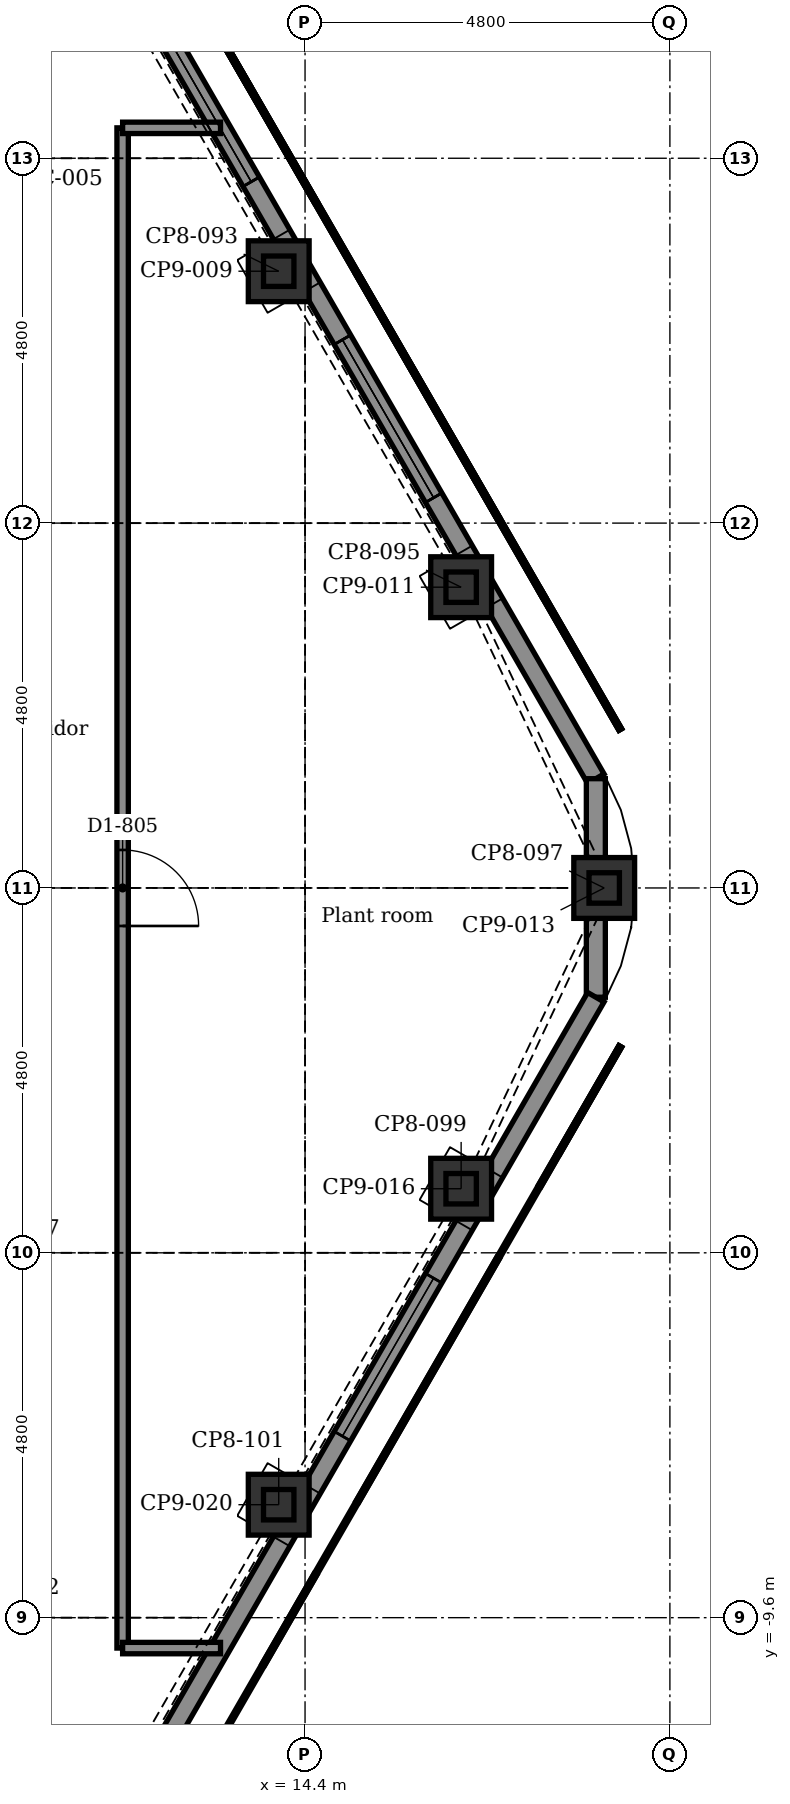
"""IFC4 building model, lengths in metres.
Left out: names, types, materials, properties, quantities, classifications, styles, units other than length and angle.
Written with IfcOpenShell. Run it as: python <this file> out.ifc"""

import sys

from ifc_helpers import new_model, si_unit, direction, frame, frame_2d, origin, origin_2d, place, context, subcontext, project, spatial, polyline, rectangle, hollow_rectangle, outline, extrude, element, fill, save


model = new_model("IFC4")
c1 = context("Model", 3, precision=1e-05, world=origin(), true_north=direction((0.0, 1.0)))
c2 = subcontext(c1, "Body", "Model", "MODEL_VIEW")
j1 = project(units=[si_unit("LENGTHUNIT", "METRE"), si_unit("PLANEANGLEUNIT", "RADIAN")], contexts=[c1])
p1 = place(None, origin())
s1 = spatial("IfcSite", under=j1, at=p1, CompositionType="ELEMENT")
p2 = place(p1, origin())
s2 = spatial("IfcBuilding", under=s1, at=p2, CompositionType="ELEMENT")
p3 = place(p2, frame((0.0, 0.0, 301.9)))
s3 = spatial("IfcBuildingStorey", under=s2, at=p3, CompositionType="ELEMENT", Elevation=301.9)
for number, where, z_axis, x_axis in (
    (1, (14.054, 8.114, -0.3), (0.0, 0.0, 1.0), (0.866, 0.5, 0.0)),
    (2, (16.454, 3.957, -0.3), (0.0, 0.0, 1.0), (0.866, 0.5, 0.0)),
    (3, (18.336, 0.0, -0.3), (0.0, 0.0, 1.0), (1.0, 0.0, 0.0)),
    (4, (16.454, -3.957, -0.3), (0.0, 0.0, 1.0), (0.5, 0.866, 0.0)),
    (5, (14.054, -8.114, -0.3), (0.0, 0.0, 1.0), (0.5, 0.866, 0.0)),
):
    element("IfcColumn", number, at=place(p3, frame(where, z_axis=z_axis, x_axis=x_axis)), inside=s3, PredefinedType="COLUMN", context=c2, shape_type="SweptSolid", body=[
        extrude(rectangle(XDim=0.8, YDim=0.8, at=origin_2d()), origin(), (0.0, 0.0, 1.0), 5.3),
    ])
p4 = place(p3, frame((14.054, 8.114, 5.0), z_axis=(0.0, 0.0, 1.0), x_axis=(1.0, 0.0, 0.0)))
e6 = element("IfcColumn", 6, at=p4, inside=s3, PredefinedType="COLUMN", context=c2, shape_type="SweptSolid", body=[
    extrude(hollow_rectangle(XDim=0.4, YDim=0.4, WallThickness=0.02, at=origin_2d()), origin(), (0.0, 0.0, 1.0), 14.916),
])
p5 = place(p3, frame((16.454, 3.957, 5.0), z_axis=(0.0, 0.0, 1.0), x_axis=(1.0, 0.0, 0.0)))
e7 = element("IfcColumn", 7, at=p5, inside=s3, PredefinedType="COLUMN", context=c2, shape_type="SweptSolid", body=[
    extrude(hollow_rectangle(XDim=0.4, YDim=0.4, WallThickness=0.02, at=origin_2d()), origin(), (0.0, 0.0, 1.0), 12.318),
])
p6 = place(p3, frame((18.336, 0.0, 5.0), z_axis=(0.0, 0.0, 1.0), x_axis=(1.0, 0.0, 0.0)))
e8 = element("IfcColumn", 8, at=p6, inside=s3, PredefinedType="COLUMN", context=c2, shape_type="SweptSolid", body=[
    extrude(hollow_rectangle(XDim=0.4, YDim=0.4, WallThickness=0.02, at=origin_2d()), origin(), (0.0, 0.0, 1.0), 9.845),
])
p7 = place(p3, frame((16.454, -3.957, 5.0), z_axis=(0.0, 0.0, 1.0), x_axis=(1.0, 0.0, 0.0)))
e9 = element("IfcColumn", 9, at=p7, inside=s3, PredefinedType="COLUMN", context=c2, shape_type="SweptSolid", body=[
    extrude(hollow_rectangle(XDim=0.4, YDim=0.4, WallThickness=0.02, at=origin_2d()), origin(), (0.0, 0.0, 1.0), 7.373),
])
p8 = place(p3, frame((14.054, -8.114, 5.0), z_axis=(0.0, 0.0, 1.0), x_axis=(1.0, 0.0, 0.0)))
e10 = element("IfcColumn", 10, at=p8, inside=s3, PredefinedType="COLUMN", context=c2, shape_type="SweptSolid", body=[
    extrude(hollow_rectangle(XDim=0.4, YDim=0.4, WallThickness=0.02, at=origin_2d()), origin(), (0.0, 0.0, 1.0), 4.775),
])
p9 = place(p3, frame((10.358, 15.065, 0.0), z_axis=(0.0, 0.0, 1.0), x_axis=(0.500010301671, -0.86601945603, 0.0)))
e11 = element("IfcWall", 11, at=p9, inside=s3, PredefinedType="SOLIDWALL", context=c2, shape_type="SweptSolid", body=[
    extrude(outline(polyline([(0.0, 0.0), (15.736, 0.0), (15.736, 15.994), (0.0, 24.509), (0.0, 0.0)])), frame((0.0, 0.125, 0.0), z_axis=(0.0, -1.0, 0.0), x_axis=(1.0, 0.0, 0.0)), (0.0, 0.0, 1.0), 0.25),
])
p10 = place(p9, frame((4.268, 0.0, 5.8)))
e12 = element("IfcOpeningElement", 12, at=p10, cuts=e11, PredefinedType="OPENING", context=c2, shape_type="SweptSolid", body=[
    extrude(rectangle(XDim=2.4, YDim=3.6, at=frame_2d((1.2, 1.8))), frame((0.0, 0.135, 0.0), z_axis=(0.0, -1.0, 0.0), x_axis=(1.0, 0.0, 0.0)), (0.0, 0.0, 1.0), 0.27),
])
p11 = place(p9, frame((4.268, 0.0, 10.0)))
e13 = element("IfcOpeningElement", 13, at=p11, cuts=e11, PredefinedType="OPENING", context=c2, shape_type="SweptSolid", body=[
    extrude(rectangle(XDim=2.4, YDim=3.6, at=frame_2d((1.2, 1.8))), frame((0.0, 0.135, 0.0), z_axis=(0.0, -1.0, 0.0), x_axis=(1.0, 0.0, 0.0)), (0.0, 0.0, 1.0), 0.27),
])
p12 = place(p9, frame((4.268, 0.0, 14.2)))
e14 = element("IfcOpeningElement", 14, at=p12, cuts=e11, PredefinedType="OPENING", context=c2, shape_type="SweptSolid", body=[
    extrude(rectangle(XDim=2.4, YDim=3.6, at=frame_2d((1.2, 1.8))), frame((0.0, 0.135, 0.0), z_axis=(0.0, -1.0, 0.0), x_axis=(1.0, 0.0, 0.0)), (0.0, 0.0, 1.0), 0.27),
])
p13 = place(p9, frame((9.068, 0.0, 5.8)))
e15 = element("IfcOpeningElement", 15, at=p13, cuts=e11, PredefinedType="OPENING", context=c2, shape_type="SweptSolid", body=[
    extrude(rectangle(XDim=2.4, YDim=3.6, at=frame_2d((1.2, 1.8))), frame((0.0, 0.135, 0.0), z_axis=(0.0, -1.0, 0.0), x_axis=(1.0, 0.0, 0.0)), (0.0, 0.0, 1.0), 0.27),
])
p14 = place(p9, frame((9.068, 0.0, 10.0)))
e16 = element("IfcOpeningElement", 16, at=p14, cuts=e11, PredefinedType="OPENING", context=c2, shape_type="SweptSolid", body=[
    extrude(rectangle(XDim=2.4, YDim=3.6, at=frame_2d((1.2, 1.8))), frame((0.0, 0.135, 0.0), z_axis=(0.0, -1.0, 0.0), x_axis=(1.0, 0.0, 0.0)), (0.0, 0.0, 1.0), 0.27),
])
p15 = place(p9, frame((9.068, 0.0, 1.0)))
e17 = element("IfcOpeningElement", 17, at=p15, cuts=e11, PredefinedType="OPENING", context=c2, shape_type="SweptSolid", body=[
    extrude(rectangle(XDim=2.4, YDim=3.0, at=frame_2d((1.2, 1.5))), frame((0.0, 0.135, 0.0), z_axis=(0.0, -1.0, 0.0), x_axis=(1.0, 0.0, 0.0)), (0.0, 0.0, 1.0), 0.27),
])
p16 = place(p3, frame((18.226, 1.438, 0.0), z_axis=(0.0, 0.0, 1.0), x_axis=(0.0, -1.0, 0.0)))
e18 = element("IfcWall", 18, at=p16, inside=s3, PredefinedType="SOLIDWALL", context=c2, shape_type="SweptSolid", body=[
    extrude(outline(polyline([(0.0, 0.0), (2.875, 0.0), (2.875, 14.197), (0.0, 15.994), (0.0, 0.0)])), frame((0.0, 0.125, 0.0), z_axis=(0.0, -1.0, 0.0), x_axis=(1.0, 0.0, 0.0)), (0.0, 0.0, 1.0), 0.25),
])
p17 = place(p3, frame((18.226, -1.438, 0.0), z_axis=(0.0, 0.0, 1.0), x_axis=(-0.500010301671, -0.86601945603, 0.0)))
e19 = element("IfcWall", 19, at=p17, inside=s3, PredefinedType="SOLIDWALL", context=c2, shape_type="SweptSolid", body=[
    extrude(outline(polyline([(0.0, 0.0), (15.736, 0.0), (15.736, 5.682), (0.0, 14.197), (0.0, 0.0)])), frame((0.0, 0.125, 0.0), z_axis=(0.0, -1.0, 0.0), x_axis=(1.0, 0.0, 0.0)), (0.0, 0.0, 1.0), 0.25),
])
p18 = place(p17, frame((4.268, 0.0, 5.8)))
e20 = element("IfcOpeningElement", 20, at=p18, cuts=e19, PredefinedType="OPENING", context=c2, shape_type="SweptSolid", body=[
    extrude(rectangle(XDim=2.4, YDim=3.6, at=frame_2d((1.2, 1.8))), frame((0.0, 0.135, 0.0), z_axis=(0.0, -1.0, 0.0), x_axis=(1.0, 0.0, 0.0)), (0.0, 0.0, 1.0), 0.27),
])
p19 = place(p17, frame((4.268, 0.0, 1.0)))
e21 = element("IfcOpeningElement", 21, at=p19, cuts=e19, PredefinedType="OPENING", context=c2, shape_type="SweptSolid", body=[
    extrude(rectangle(XDim=2.4, YDim=3.0, at=frame_2d((1.2, 1.5))), frame((0.0, 0.135, 0.0), z_axis=(0.0, -1.0, 0.0), x_axis=(1.0, 0.0, 0.0)), (0.0, 0.0, 1.0), 0.27),
])
p20 = place(p3, frame((12.0, -10.0, 0.0), z_axis=(0.0, 0.0, 1.0), x_axis=(0.0, 1.0, 0.0)))
e22 = element("IfcWall", 22, at=p20, inside=s3, PredefinedType="PARTITIONING", context=c2, shape_type="SweptSolid", body=[
    extrude(rectangle(XDim=20.0, YDim=0.15, at=frame_2d((10.0, 0.0))), origin(), (0.0, 0.0, 1.0), 5.0),
])
p21 = place(p20, frame((9.5, 0.0, 0.0)))
e23 = element("IfcOpeningElement", 23, at=p21, cuts=e22, PredefinedType="OPENING", context=c2, shape_type="SweptSolid", body=[
    extrude(rectangle(XDim=1.0, YDim=2.1, at=frame_2d((0.5, 1.05))), frame((0.0, 0.085, 0.0), z_axis=(0.0, -1.0, 0.0), x_axis=(1.0, 0.0, 0.0)), (0.0, 0.0, 1.0), 0.17),
])
for number, where, z_axis, x_axis in (
    (24, (12.0, -10.0, 0.0), (0.0, 0.0, 1.0), (1.0, 0.0, 0.0)),
    (25, (12.0, 10.0, 0.0), (0.0, 0.0, 1.0), (1.0, 0.0, 0.0)),
):
    element("IfcWall", number, at=place(p3, frame(where, z_axis=z_axis, x_axis=x_axis)), inside=s3, PredefinedType="PARTITIONING", context=c2, shape_type="SweptSolid", body=[
        extrude(rectangle(XDim=1.288, YDim=0.15, at=frame_2d((0.644, 0.0))), origin(), (0.0, 0.0, 1.0), 5.0),
    ])
p22 = place(p21, frame((1.0, 0.0, 0.0), z_axis=(0.0, 0.0, 1.0), x_axis=(-1.0, 0.0, 0.0)))
e26 = element("IfcDoor", 26, at=p22, inside=s3, OperationType="SINGLE_SWING_LEFT", PredefinedType="DOOR", context=c2, shape_type="SweptSolid", body=[
    extrude(rectangle(XDim=1.0, YDim=2.1, at=frame_2d((0.5, 1.05))), frame((0.0, 0.025, 0.0), z_axis=(0.0, -1.0, 0.0), x_axis=(1.0, 0.0, 0.0)), (0.0, 0.0, 1.0), 0.05),
])
fill(e23, e26)
p23 = place(p10, origin())
e27 = element("IfcWindow", 27, at=p23, inside=s3, PartitioningType="SINGLE_PANEL", PredefinedType="WINDOW", context=c2, shape_type="SweptSolid", body=[
    extrude(rectangle(XDim=2.4, YDim=3.6, at=frame_2d((1.2, 1.8))), frame((0.0, 0.03, 0.0), z_axis=(0.0, -1.0, 0.0), x_axis=(1.0, 0.0, 0.0)), (0.0, 0.0, 1.0), 0.06),
])
fill(e12, e27)
p24 = place(p11, origin())
e28 = element("IfcWindow", 28, at=p24, inside=s3, PartitioningType="SINGLE_PANEL", PredefinedType="WINDOW", context=c2, shape_type="SweptSolid", body=[
    extrude(rectangle(XDim=2.4, YDim=3.6, at=frame_2d((1.2, 1.8))), frame((0.0, 0.03, 0.0), z_axis=(0.0, -1.0, 0.0), x_axis=(1.0, 0.0, 0.0)), (0.0, 0.0, 1.0), 0.06),
])
fill(e13, e28)
p25 = place(p12, origin())
e29 = element("IfcWindow", 29, at=p25, inside=s3, PartitioningType="SINGLE_PANEL", PredefinedType="WINDOW", context=c2, shape_type="SweptSolid", body=[
    extrude(rectangle(XDim=2.4, YDim=3.6, at=frame_2d((1.2, 1.8))), frame((0.0, 0.03, 0.0), z_axis=(0.0, -1.0, 0.0), x_axis=(1.0, 0.0, 0.0)), (0.0, 0.0, 1.0), 0.06),
])
fill(e14, e29)
p26 = place(p13, origin())
e30 = element("IfcWindow", 30, at=p26, inside=s3, PartitioningType="SINGLE_PANEL", PredefinedType="WINDOW", context=c2, shape_type="SweptSolid", body=[
    extrude(rectangle(XDim=2.4, YDim=3.6, at=frame_2d((1.2, 1.8))), frame((0.0, 0.03, 0.0), z_axis=(0.0, -1.0, 0.0), x_axis=(1.0, 0.0, 0.0)), (0.0, 0.0, 1.0), 0.06),
])
fill(e15, e30)
p27 = place(p14, origin())
e31 = element("IfcWindow", 31, at=p27, inside=s3, PartitioningType="SINGLE_PANEL", PredefinedType="WINDOW", context=c2, shape_type="SweptSolid", body=[
    extrude(rectangle(XDim=2.4, YDim=3.6, at=frame_2d((1.2, 1.8))), frame((0.0, 0.03, 0.0), z_axis=(0.0, -1.0, 0.0), x_axis=(1.0, 0.0, 0.0)), (0.0, 0.0, 1.0), 0.06),
])
fill(e16, e31)
p28 = place(p18, origin())
e32 = element("IfcWindow", 32, at=p28, inside=s3, PartitioningType="SINGLE_PANEL", PredefinedType="WINDOW", context=c2, shape_type="SweptSolid", body=[
    extrude(rectangle(XDim=2.4, YDim=3.6, at=frame_2d((1.2, 1.8))), frame((0.0, 0.03, 0.0), z_axis=(0.0, -1.0, 0.0), x_axis=(1.0, 0.0, 0.0)), (0.0, 0.0, 1.0), 0.06),
])
fill(e20, e32)
p29 = place(p15, origin())
e33 = element("IfcWindow", 33, at=p29, inside=s3, PartitioningType="SINGLE_PANEL", PredefinedType="WINDOW", context=c2, shape_type="SweptSolid", body=[
    extrude(rectangle(XDim=2.4, YDim=3.0, at=frame_2d((1.2, 1.5))), frame((0.0, 0.03, 0.0), z_axis=(0.0, -1.0, 0.0), x_axis=(1.0, 0.0, 0.0)), (0.0, 0.0, 1.0), 0.06),
])
fill(e17, e33)
p30 = place(p19, origin())
e34 = element("IfcWindow", 34, at=p30, inside=s3, PartitioningType="SINGLE_PANEL", PredefinedType="WINDOW", context=c2, shape_type="SweptSolid", body=[
    extrude(rectangle(XDim=2.4, YDim=3.0, at=frame_2d((1.2, 1.5))), frame((0.0, 0.03, 0.0), z_axis=(0.0, -1.0, 0.0), x_axis=(1.0, 0.0, 0.0)), (0.0, 0.0, 1.0), 0.06),
])
fill(e21, e34)
save(model, sys.argv[1])
